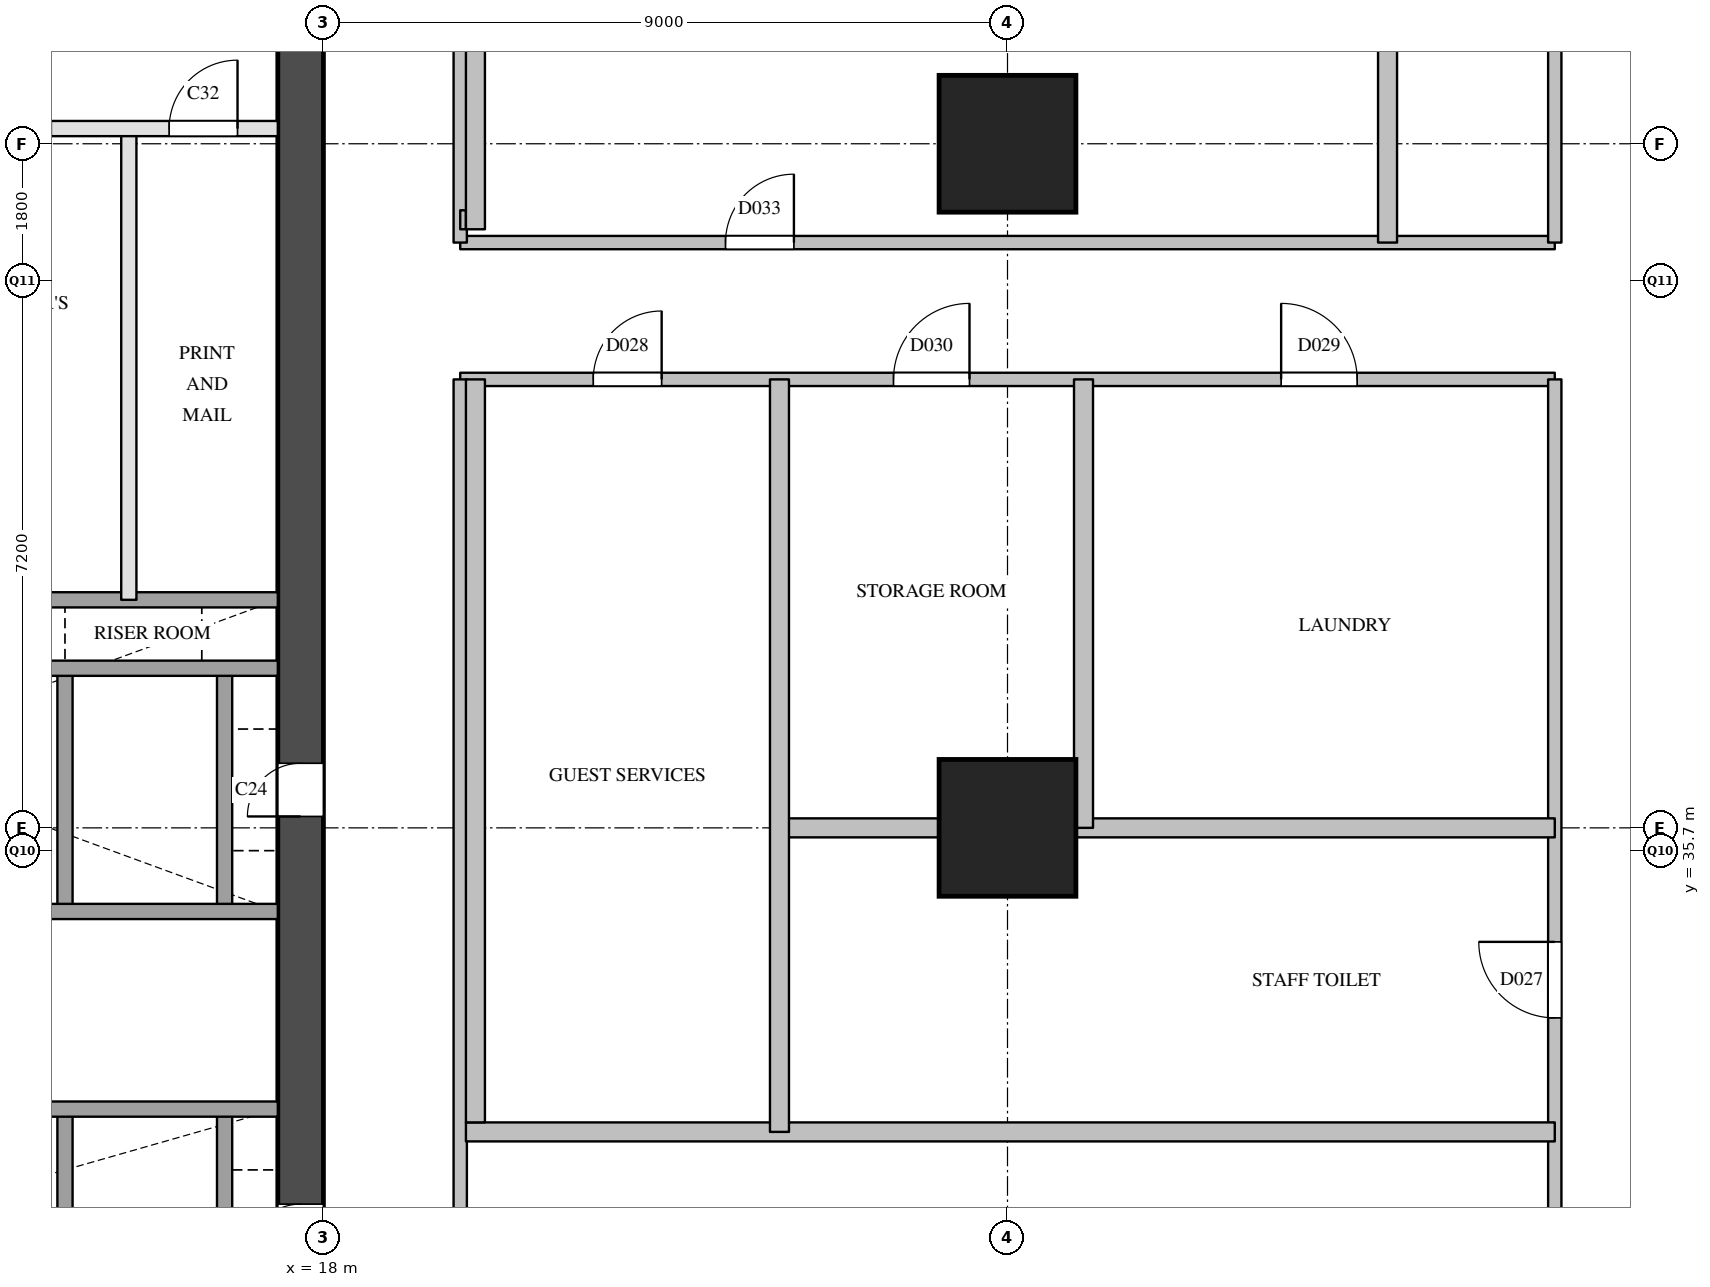
"""IFC4 building model, lengths in metres.
Left out: names, types, materials, properties, quantities, classifications, styles, units other than length and angle.
Written with IfcOpenShell. Run it as: python <this file> out.ifc"""

import sys

from ifc_helpers import new_model, si_unit, direction, frame, frame_2d, origin, origin_2d, place, context, subcontext, project, spatial, rectangle, extrude, element, fill, save


model = new_model("IFC4")
c1 = context("Model", 3, precision=1e-05, world=origin(), true_north=direction((0.0, 1.0)))
c2 = subcontext(c1, "Body", "Model", "MODEL_VIEW")
j1 = project(units=[si_unit("LENGTHUNIT", "METRE"), si_unit("PLANEANGLEUNIT", "RADIAN")], contexts=[c1])
p1 = place(None, origin())
s1 = spatial("IfcSite", under=j1, at=p1, CompositionType="ELEMENT")
p2 = place(p1, origin())
s2 = spatial("IfcBuilding", under=s1, at=p2, CompositionType="ELEMENT")
p3 = place(p2, frame((0.0, 0.0, 81.6)))
s3 = spatial("IfcBuildingStorey", under=s2, at=p3, CompositionType="ELEMENT", Elevation=81.6)
for number, where, z_axis, x_axis in (
    (1, (27.0, 36.0, 0.0), (0.0, 0.0, 1.0), (1.0, 0.0, 0.0)),
    (2, (27.0, 45.0, 0.0), (0.0, 0.0, 1.0), (1.0, 0.0, 0.0)),
):
    element("IfcColumn", number, at=place(p3, frame(where, z_axis=z_axis, x_axis=x_axis)), inside=s3, PredefinedType="COLUMN", context=c2, shape_type="SweptSolid", body=[
        extrude(rectangle(XDim=1.8, YDim=1.8, at=origin_2d()), origin(), (0.0, 0.0, 1.0), 3.8),
    ])
p4 = place(p3, frame((17.7, 29.1, 0.0), z_axis=(0.0, 0.0, 1.0), x_axis=(0.0, 1.0, 0.0)))
e3 = element("IfcWall", 3, at=p4, inside=s3, PredefinedType="SHEAR", context=c2, shape_type="SweptSolid", body=[
    extrude(rectangle(XDim=20.3, YDim=0.6, at=frame_2d((10.15, 0.0))), origin(), (0.0, 0.0, 1.0), 3.5),
])
p5 = place(p4, frame((1.25, 0.0, 0.0)))
e4 = element("IfcOpeningElement", 4, at=p5, cuts=e3, PredefinedType="OPENING", context=c2, shape_type="SweptSolid", body=[
    extrude(rectangle(XDim=0.7, YDim=2.1, at=frame_2d((0.35, 1.05))), frame((0.0, 0.31, 0.0), z_axis=(0.0, -1.0, 0.0), x_axis=(1.0, 0.0, 0.0)), (0.0, 0.0, 1.0), 0.62),
])
p6 = place(p4, frame((7.05, 0.0, 0.0)))
e5 = element("IfcOpeningElement", 5, at=p6, cuts=e3, PredefinedType="OPENING", context=c2, shape_type="SweptSolid", body=[
    extrude(rectangle(XDim=0.7, YDim=2.1, at=frame_2d((0.35, 1.05))), frame((0.0, 0.31, 0.0), z_axis=(0.0, -1.0, 0.0), x_axis=(1.0, 0.0, 0.0)), (0.0, 0.0, 1.0), 0.62),
])
p7 = place(p3, frame((14.6, 29.1, 0.0), z_axis=(0.0, 0.0, 1.0), x_axis=(0.0, 1.0, 0.0)))
e6 = element("IfcWall", 6, at=p7, inside=s3, PredefinedType="SOLIDWALL", context=c2, shape_type="SweptSolid", body=[
    extrude(rectangle(XDim=3.2, YDim=0.2, at=frame_2d((1.6, 0.0))), origin(), (0.0, 0.0, 1.0), 3.5),
])
p8 = place(p3, frame((14.6, 34.9, 0.0), z_axis=(0.0, 0.0, 1.0), x_axis=(0.0, 1.0, 0.0)))
e7 = element("IfcWall", 7, at=p8, inside=s3, PredefinedType="SOLIDWALL", context=c2, shape_type="SweptSolid", body=[
    extrude(rectangle(XDim=3.2, YDim=0.2, at=frame_2d((1.6, 0.0))), origin(), (0.0, 0.0, 1.0), 3.5),
])
p9 = place(p3, frame((15.44, 39.0, 0.0), z_axis=(0.0, 0.0, 1.0), x_axis=(0.0, 1.0, 0.0)))
e8 = element("IfcWall", 8, at=p9, inside=s3, PredefinedType="PARTITIONING", context=c2, shape_type="SweptSolid", body=[
    extrude(rectangle(XDim=6.2, YDim=0.2, at=frame_2d((3.1, 0.0))), origin(), (0.0, 0.0, 1.0), 3.5),
])
p10 = place(p3, frame((16.7, 29.1, 0.0), z_axis=(0.0, 0.0, 1.0), x_axis=(0.0, 1.0, 0.0)))
e9 = element("IfcWall", 9, at=p10, inside=s3, PredefinedType="SOLIDWALL", context=c2, shape_type="SweptSolid", body=[
    extrude(rectangle(XDim=3.2, YDim=0.2, at=frame_2d((1.6, 0.0))), origin(), (0.0, 0.0, 1.0), 3.5),
])
p11 = place(p3, frame((16.7, 34.9, 0.0), z_axis=(0.0, 0.0, 1.0), x_axis=(0.0, 1.0, 0.0)))
e10 = element("IfcWall", 10, at=p11, inside=s3, PredefinedType="SOLIDWALL", context=c2, shape_type="SweptSolid", body=[
    extrude(rectangle(XDim=3.2, YDim=0.2, at=frame_2d((1.6, 0.0))), origin(), (0.0, 0.0, 1.0), 3.5),
])
p12 = place(p3, frame((6.2, 32.3, 0.0), z_axis=(0.0, 0.0, 1.0), x_axis=(1.0, 0.0, 0.0)))
e11 = element("IfcWall", 11, at=p12, inside=s3, PredefinedType="SOLIDWALL", context=c2, shape_type="SweptSolid", body=[
    extrude(rectangle(XDim=11.2, YDim=0.2, at=frame_2d((5.6, 0.0))), origin(), (0.0, 0.0, 1.0), 3.5),
])
p13 = place(p12, frame((2.55, 0.0, 0.0)))
e12 = element("IfcOpeningElement", 12, at=p13, cuts=e11, PredefinedType="OPENING", context=c2, shape_type="SweptSolid", body=[
    extrude(rectangle(XDim=1.2, YDim=2.1, at=frame_2d((0.6, 1.05))), frame((0.0, 0.11, 0.0), z_axis=(0.0, -1.0, 0.0), x_axis=(1.0, 0.0, 0.0)), (0.0, 0.0, 1.0), 0.22),
])
p14 = place(p3, frame((6.2, 34.9, 0.0), z_axis=(0.0, 0.0, 1.0), x_axis=(1.0, 0.0, 0.0)))
e13 = element("IfcWall", 13, at=p14, inside=s3, PredefinedType="SOLIDWALL", context=c2, shape_type="SweptSolid", body=[
    extrude(rectangle(XDim=11.2, YDim=0.2, at=frame_2d((5.6, 0.0))), origin(), (0.0, 0.0, 1.0), 3.5),
])
p15 = place(p3, frame((6.2, 38.1, 0.0), z_axis=(0.0, 0.0, 1.0), x_axis=(1.0, 0.0, 0.0)))
e14 = element("IfcWall", 14, at=p15, inside=s3, PredefinedType="SOLIDWALL", context=c2, shape_type="SweptSolid", body=[
    extrude(rectangle(XDim=11.2, YDim=0.2, at=frame_2d((5.6, 0.0))), origin(), (0.0, 0.0, 1.0), 3.5),
])
p16 = place(p15, frame((0.45, 0.0, 0.0)))
e15 = element("IfcOpeningElement", 15, at=p16, cuts=e14, PredefinedType="OPENING", context=c2, shape_type="SweptSolid", body=[
    extrude(rectangle(XDim=1.2, YDim=2.1, at=frame_2d((0.6, 1.05))), frame((0.0, 0.11, 0.0), z_axis=(0.0, -1.0, 0.0), x_axis=(1.0, 0.0, 0.0)), (0.0, 0.0, 1.0), 0.22),
])
p17 = place(p15, frame((2.55, 0.0, 0.0)))
e16 = element("IfcOpeningElement", 16, at=p17, cuts=e14, PredefinedType="OPENING", context=c2, shape_type="SweptSolid", body=[
    extrude(rectangle(XDim=1.2, YDim=2.1, at=frame_2d((0.6, 1.05))), frame((0.0, 0.11, 0.0), z_axis=(0.0, -1.0, 0.0), x_axis=(1.0, 0.0, 0.0)), (0.0, 0.0, 1.0), 0.22),
])
p18 = place(p15, frame((4.65, 0.0, 0.0)))
e17 = element("IfcOpeningElement", 17, at=p18, cuts=e14, PredefinedType="OPENING", context=c2, shape_type="SweptSolid", body=[
    extrude(rectangle(XDim=1.2, YDim=2.1, at=frame_2d((0.6, 1.05))), frame((0.0, 0.11, 0.0), z_axis=(0.0, -1.0, 0.0), x_axis=(1.0, 0.0, 0.0)), (0.0, 0.0, 1.0), 0.22),
])
p19 = place(p15, frame((6.75, 0.0, 0.0)))
e18 = element("IfcOpeningElement", 18, at=p19, cuts=e14, PredefinedType="OPENING", context=c2, shape_type="SweptSolid", body=[
    extrude(rectangle(XDim=1.2, YDim=2.1, at=frame_2d((0.6, 1.05))), frame((0.0, 0.11, 0.0), z_axis=(0.0, -1.0, 0.0), x_axis=(1.0, 0.0, 0.0)), (0.0, 0.0, 1.0), 0.22),
])
p20 = place(p3, frame((12.5, 39.0, 0.0), z_axis=(0.0, 0.0, 1.0), x_axis=(1.0, 0.0, 0.0)))
e19 = element("IfcWall", 19, at=p20, inside=s3, PredefinedType="SOLIDWALL", context=c2, shape_type="SweptSolid", body=[
    extrude(rectangle(XDim=4.9, YDim=0.2, at=frame_2d((2.45, 0.0))), origin(), (0.0, 0.0, 1.0), 3.5),
])
p21 = place(p3, frame((12.5, 45.2, 0.0), z_axis=(0.0, 0.0, 1.0), x_axis=(1.0, 0.0, 0.0)))
e20 = element("IfcWall", 20, at=p21, inside=s3, PredefinedType="PARTITIONING", context=c2, shape_type="SweptSolid", body=[
    extrude(rectangle(XDim=4.9, YDim=0.2, at=frame_2d((2.45, 0.0))), origin(), (0.0, 0.0, 1.0), 3.5),
])
p22 = place(p21, frame((1.02, 0.0, 0.0)))
e21 = element("IfcOpeningElement", 21, at=p22, cuts=e20, PredefinedType="OPENING", context=c2, shape_type="SweptSolid", body=[
    extrude(rectangle(XDim=0.9, YDim=2.1, at=frame_2d((0.45, 1.05))), frame((0.0, 0.11, 0.0), z_axis=(0.0, -1.0, 0.0), x_axis=(1.0, 0.0, 0.0)), (0.0, 0.0, 1.0), 0.22),
])
p23 = place(p21, frame((3.47, 0.0, 0.0)))
e22 = element("IfcOpeningElement", 22, at=p23, cuts=e20, PredefinedType="OPENING", context=c2, shape_type="SweptSolid", body=[
    extrude(rectangle(XDim=0.9, YDim=2.1, at=frame_2d((0.45, 1.05))), frame((0.0, 0.11, 0.0), z_axis=(0.0, -1.0, 0.0), x_axis=(1.0, 0.0, 0.0)), (0.0, 0.0, 1.0), 0.22),
])
p24 = place(p3, frame((19.8, 41.9, 0.0), z_axis=(0.0, 0.0, 1.0), x_axis=(1.0, 0.0, 0.0)))
e23 = element("IfcWall", 23, at=p24, inside=s3, PredefinedType="PARTITIONING", context=c2, shape_type="SweptSolid", body=[
    extrude(rectangle(XDim=14.4, YDim=0.175, at=frame_2d((7.2, 0.0))), origin(), (0.0, 0.0, 1.0), 2.5),
])
p25 = place(p24, frame((1.75, 0.0, 0.0)))
e24 = element("IfcOpeningElement", 24, at=p25, cuts=e23, PredefinedType="OPENING", context=c2, shape_type="SweptSolid", body=[
    extrude(rectangle(XDim=0.9, YDim=2.1, at=frame_2d((0.45, 1.05))), frame((0.0, 0.097, 0.0), z_axis=(0.0, -1.0, 0.0), x_axis=(1.0, 0.0, 0.0)), (0.0, 0.0, 1.0), 0.195),
])
p26 = place(p24, frame((10.8, 0.0, 0.0)))
e25 = element("IfcOpeningElement", 25, at=p26, cuts=e23, PredefinedType="OPENING", context=c2, shape_type="SweptSolid", body=[
    extrude(rectangle(XDim=1.0, YDim=2.1, at=frame_2d((0.5, 1.05))), frame((0.0, 0.097, 0.0), z_axis=(0.0, -1.0, 0.0), x_axis=(1.0, 0.0, 0.0)), (0.0, 0.0, 1.0), 0.195),
])
p27 = place(p24, frame((5.7, 0.0, 0.0)))
e26 = element("IfcOpeningElement", 26, at=p27, cuts=e23, PredefinedType="OPENING", context=c2, shape_type="SweptSolid", body=[
    extrude(rectangle(XDim=1.0, YDim=2.1, at=frame_2d((0.5, 1.05))), frame((0.0, 0.097, 0.0), z_axis=(0.0, -1.0, 0.0), x_axis=(1.0, 0.0, 0.0)), (0.0, 0.0, 1.0), 0.195),
])
p28 = place(p3, frame((19.8, 43.7, 0.0), z_axis=(0.0, 0.0, 1.0), x_axis=(1.0, 0.0, 0.0)))
e27 = element("IfcWall", 27, at=p28, inside=s3, PredefinedType="PARTITIONING", context=c2, shape_type="SweptSolid", body=[
    extrude(rectangle(XDim=14.4, YDim=0.175, at=frame_2d((7.2, 0.0))), origin(), (0.0, 0.0, 1.0), 2.5),
])
p29 = place(p28, frame((3.49, 0.0, 0.0)))
e28 = element("IfcOpeningElement", 28, at=p29, cuts=e27, PredefinedType="OPENING", context=c2, shape_type="SweptSolid", body=[
    extrude(rectangle(XDim=0.9, YDim=2.1, at=frame_2d((0.45, 1.05))), frame((0.0, 0.097, 0.0), z_axis=(0.0, -1.0, 0.0), x_axis=(1.0, 0.0, 0.0)), (0.0, 0.0, 1.0), 0.195),
])
p30 = place(p3, frame((19.8, 28.5, 0.0), z_axis=(0.0, 0.0, 1.0), x_axis=(0.0, 1.0, 0.0)))
e29 = element("IfcWall", 29, at=p30, inside=s3, PredefinedType="PARTITIONING", context=c2, shape_type="SweptSolid", body=[
    extrude(rectangle(XDim=13.4, YDim=0.175, at=frame_2d((6.7, 0.0))), origin(), (0.0, 0.0, 1.0), 3.5),
])
p31 = place(p3, frame((19.8, 43.7, 0.0), z_axis=(0.0, 0.0, 1.0), x_axis=(0.0, 1.0, 0.0)))
e30 = element("IfcWall", 30, at=p31, inside=s3, PredefinedType="PARTITIONING", context=c2, shape_type="SweptSolid", body=[
    extrude(rectangle(XDim=8.1, YDim=0.175, at=frame_2d((4.05, 0.0))), origin(), (0.0, 0.0, 1.0), 3.5),
])
p32 = place(p3, frame((34.2, 29.12, 0.0), z_axis=(0.0, 0.0, 1.0), x_axis=(0.0, 1.0, 0.0)))
e31 = element("IfcWall", 31, at=p32, inside=s3, PredefinedType="PARTITIONING", context=c2, shape_type="SweptSolid", body=[
    extrude(rectangle(XDim=12.78, YDim=0.175, at=frame_2d((6.39, 0.0))), origin(), (0.0, 0.0, 1.0), 3.5),
])
p33 = place(p32, frame((4.38, 0.0, 0.0)))
e32 = element("IfcOpeningElement", 32, at=p33, cuts=e31, PredefinedType="OPENING", context=c2, shape_type="SweptSolid", body=[
    extrude(rectangle(XDim=1.0, YDim=2.1, at=frame_2d((0.5, 1.05))), frame((0.0, 0.097, 0.0), z_axis=(0.0, -1.0, 0.0), x_axis=(1.0, 0.0, 0.0)), (0.0, 0.0, 1.0), 0.195),
])
p34 = place(p3, frame((34.2, 43.7, 0.0), z_axis=(0.0, 0.0, 1.0), x_axis=(0.0, 1.0, 0.0)))
e33 = element("IfcWall", 33, at=p34, inside=s3, PredefinedType="PARTITIONING", context=c2, shape_type="SweptSolid", body=[
    extrude(rectangle(XDim=8.1, YDim=0.175, at=frame_2d((4.05, 0.0))), origin(), (0.0, 0.0, 1.0), 3.5),
])
p35 = place(p34, frame((3.6, 0.0, 0.0)))
e34 = element("IfcOpeningElement", 34, at=p35, cuts=e33, PredefinedType="OPENING", context=c2, shape_type="SweptSolid", body=[
    extrude(rectangle(XDim=0.9, YDim=2.1, at=frame_2d((0.45, 1.05))), frame((0.0, 0.097, 0.0), z_axis=(0.0, -1.0, 0.0), x_axis=(1.0, 0.0, 0.0)), (0.0, 0.0, 1.0), 0.195),
])
p36 = place(p3, frame((19.875, 32.0, 0.0), z_axis=(0.0, 0.0, 1.0), x_axis=(1.0, 0.0, 0.0)))
e35 = element("IfcWall", 35, at=p36, inside=s3, PredefinedType="PARTITIONING", context=c2, shape_type="SweptSolid", body=[
    extrude(rectangle(XDim=14.325, YDim=0.25, at=frame_2d((7.163, 0.0))), origin(), (0.0, 0.0, 1.0), 2.5),
])
p37 = place(p3, frame((24.0, 36.0, 0.0), z_axis=(0.0, 0.0, 1.0), x_axis=(1.0, 0.0, 0.0)))
e36 = element("IfcWall", 36, at=p37, inside=s3, PredefinedType="PARTITIONING", context=c2, shape_type="SweptSolid", body=[
    extrude(rectangle(XDim=10.2, YDim=0.25, at=frame_2d((5.1, 0.0))), origin(), (0.0, 0.0, 1.0), 3.5),
])
p38 = place(p3, frame((19.8, 44.0, 0.0), z_axis=(0.0, 0.0, 1.0), x_axis=(1.0, 0.0, 0.0)))
e37 = element("IfcWall", 37, at=p38, inside=s3, PredefinedType="PARTITIONING", context=c2, shape_type="SweptSolid", body=[
    extrude(rectangle(XDim=0.075, YDim=0.25, at=frame_2d((0.038, 0.0))), origin(), (0.0, 0.0, 1.0), 3.5),
])
p39 = place(p3, frame((20.0, 32.125, 0.0), z_axis=(0.0, 0.0, 1.0), x_axis=(0.0, 1.0, 0.0)))
e38 = element("IfcWall", 38, at=p39, inside=s3, PredefinedType="PARTITIONING", context=c2, shape_type="SweptSolid", body=[
    extrude(rectangle(XDim=9.775, YDim=0.25, at=frame_2d((4.887, 0.0))), origin(), (0.0, 0.0, 1.0), 3.5),
])
p40 = place(p3, frame((20.0, 43.875, 0.0), z_axis=(0.0, 0.0, 1.0), x_axis=(0.0, 1.0, 0.0)))
e39 = element("IfcWall", 39, at=p40, inside=s3, PredefinedType="PARTITIONING", context=c2, shape_type="SweptSolid", body=[
    extrude(rectangle(XDim=10.125, YDim=0.25, at=frame_2d((5.062, 0.0))), origin(), (0.0, 0.0, 1.0), 2.5),
])
p41 = place(p3, frame((24.0, 32.0, 0.0), z_axis=(0.0, 0.0, 1.0), x_axis=(0.0, 1.0, 0.0)))
e40 = element("IfcWall", 40, at=p41, inside=s3, PredefinedType="PARTITIONING", context=c2, shape_type="SweptSolid", body=[
    extrude(rectangle(XDim=9.9, YDim=0.25, at=frame_2d((4.95, 0.0))), origin(), (0.0, 0.0, 1.0), 3.5),
])
p42 = place(p3, frame((28.0, 36.0, 0.0), z_axis=(0.0, 0.0, 1.0), x_axis=(0.0, 1.0, 0.0)))
e41 = element("IfcWall", 41, at=p42, inside=s3, PredefinedType="PARTITIONING", context=c2, shape_type="SweptSolid", body=[
    extrude(rectangle(XDim=5.9, YDim=0.25, at=frame_2d((2.95, 0.0))), origin(), (0.0, 0.0, 1.0), 3.5),
])
p43 = place(p3, frame((32.0, 43.7, 0.0), z_axis=(0.0, 0.0, 1.0), x_axis=(0.0, 1.0, 0.0)))
e42 = element("IfcWall", 42, at=p43, inside=s3, PredefinedType="PARTITIONING", context=c2, shape_type="SweptSolid", body=[
    extrude(rectangle(XDim=10.3, YDim=0.25, at=frame_2d((5.15, 0.0))), origin(), (0.0, 0.0, 1.0), 2.5),
])
p44 = place(p5, origin())
e43 = element("IfcDoor", 43, at=p44, inside=s3, OperationType="SINGLE_SWING_LEFT", PredefinedType="DOOR", context=c2, shape_type="SweptSolid", body=[
    extrude(rectangle(XDim=0.7, YDim=2.1, at=frame_2d((0.35, 1.05))), frame((0.0, 0.025, 0.0), z_axis=(0.0, -1.0, 0.0), x_axis=(1.0, 0.0, 0.0)), (0.0, 0.0, 1.0), 0.05),
])
fill(e4, e43)
p45 = place(p6, origin())
e44 = element("IfcDoor", 44, at=p45, inside=s3, OperationType="SINGLE_SWING_LEFT", PredefinedType="DOOR", context=c2, shape_type="SweptSolid", body=[
    extrude(rectangle(XDim=0.7, YDim=2.1, at=frame_2d((0.35, 1.05))), frame((0.0, 0.025, 0.0), z_axis=(0.0, -1.0, 0.0), x_axis=(1.0, 0.0, 0.0)), (0.0, 0.0, 1.0), 0.05),
])
fill(e5, e44)
p46 = place(p23, origin())
e45 = element("IfcDoor", 45, at=p46, inside=s3, OperationType="SINGLE_SWING_RIGHT", PredefinedType="DOOR", context=c2, shape_type="SweptSolid", body=[
    extrude(rectangle(XDim=0.9, YDim=2.1, at=frame_2d((0.45, 1.05))), frame((0.0, 0.025, 0.0), z_axis=(0.0, -1.0, 0.0), x_axis=(1.0, 0.0, 0.0)), (0.0, 0.0, 1.0), 0.05),
])
fill(e22, e45)
p47 = place(p33, origin())
e46 = element("IfcDoor", 46, at=p47, inside=s3, OperationType="SINGLE_SWING_RIGHT", PredefinedType="DOOR", context=c2, shape_type="SweptSolid", body=[
    extrude(rectangle(XDim=1.0, YDim=2.1, at=frame_2d((0.5, 1.05))), frame((0.0, 0.025, 0.0), z_axis=(0.0, -1.0, 0.0), x_axis=(1.0, 0.0, 0.0)), (0.0, 0.0, 1.0), 0.05),
])
fill(e32, e46)
p48 = place(p25, origin())
e47 = element("IfcDoor", 47, at=p48, inside=s3, OperationType="SINGLE_SWING_RIGHT", PredefinedType="DOOR", context=c2, shape_type="SweptSolid", body=[
    extrude(rectangle(XDim=0.9, YDim=2.1, at=frame_2d((0.45, 1.05))), frame((0.0, 0.025, 0.0), z_axis=(0.0, -1.0, 0.0), x_axis=(1.0, 0.0, 0.0)), (0.0, 0.0, 1.0), 0.05),
])
fill(e24, e47)
p49 = place(p26, origin())
e48 = element("IfcDoor", 48, at=p49, inside=s3, OperationType="SINGLE_SWING_LEFT", PredefinedType="DOOR", context=c2, shape_type="SweptSolid", body=[
    extrude(rectangle(XDim=1.0, YDim=2.1, at=frame_2d((0.5, 1.05))), frame((0.0, 0.025, 0.0), z_axis=(0.0, -1.0, 0.0), x_axis=(1.0, 0.0, 0.0)), (0.0, 0.0, 1.0), 0.05),
])
fill(e25, e48)
p50 = place(p27, origin())
e49 = element("IfcDoor", 49, at=p50, inside=s3, OperationType="SINGLE_SWING_RIGHT", PredefinedType="DOOR", context=c2, shape_type="SweptSolid", body=[
    extrude(rectangle(XDim=1.0, YDim=2.1, at=frame_2d((0.5, 1.05))), frame((0.0, 0.025, 0.0), z_axis=(0.0, -1.0, 0.0), x_axis=(1.0, 0.0, 0.0)), (0.0, 0.0, 1.0), 0.05),
])
fill(e26, e49)
p51 = place(p29, origin())
e50 = element("IfcDoor", 50, at=p51, inside=s3, OperationType="SINGLE_SWING_RIGHT", PredefinedType="DOOR", context=c2, shape_type="SweptSolid", body=[
    extrude(rectangle(XDim=0.9, YDim=2.1, at=frame_2d((0.45, 1.05))), frame((0.0, 0.025, 0.0), z_axis=(0.0, -1.0, 0.0), x_axis=(1.0, 0.0, 0.0)), (0.0, 0.0, 1.0), 0.05),
])
fill(e28, e50)
save(model, sys.argv[1])
